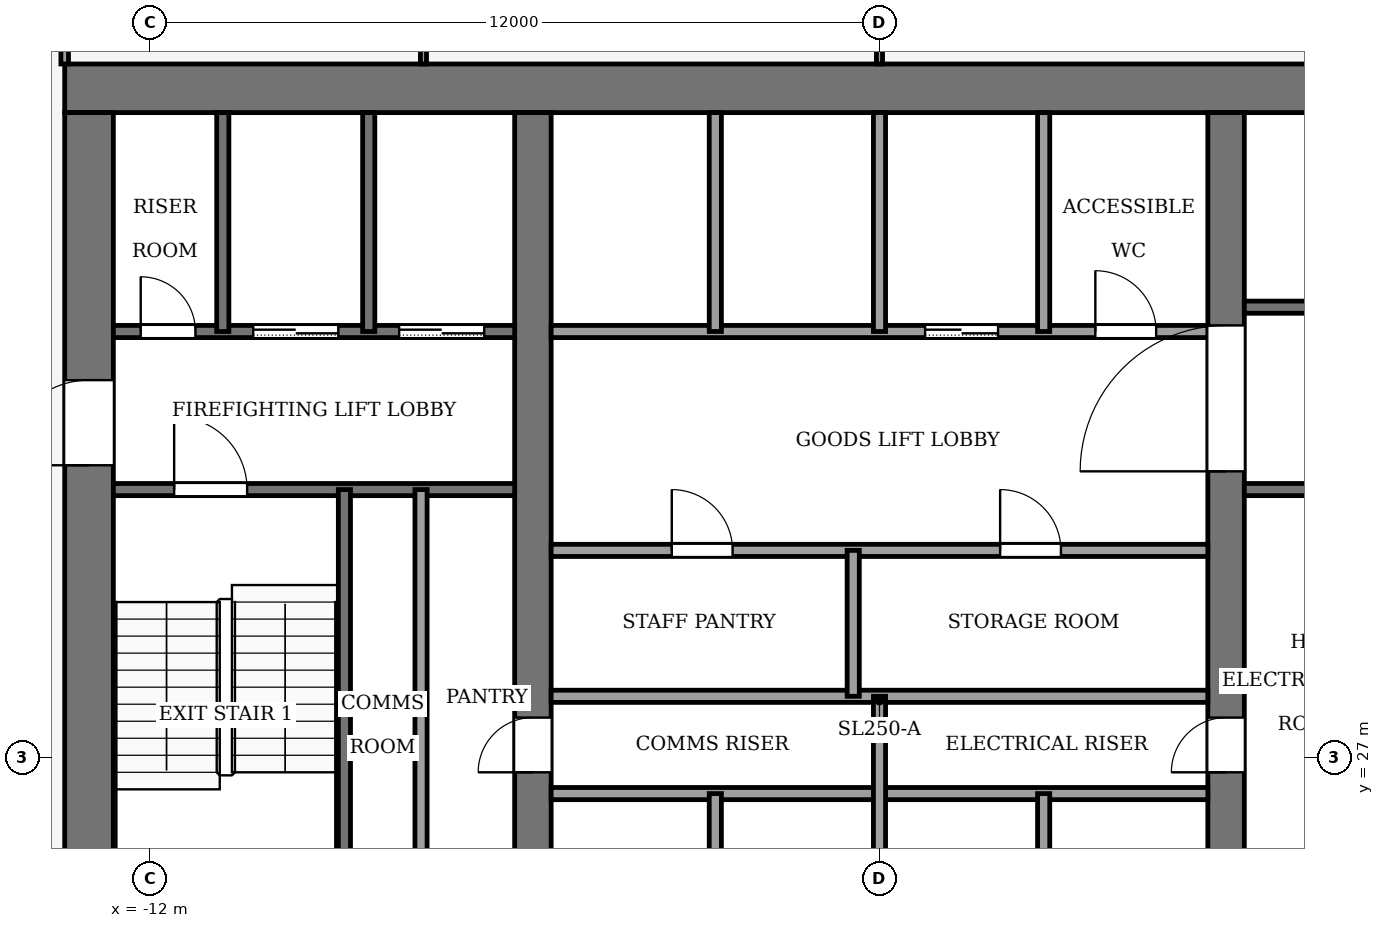
"""IFC4 building model, lengths in metres.
Left out: names, types, materials, properties, quantities, classifications, styles, units other than length and angle.
Written with IfcOpenShell. Run it as: python <this file> out.ifc"""

import sys

from ifc_helpers import new_model, si_unit, direction, frame, frame_2d, origin, place, context, subcontext, project, spatial, rectangle, extrude, element, fill, save


model = new_model("IFC4")
c1 = context("Model", 3, precision=1e-05, world=origin(), true_north=direction((0.0, 1.0)))
c2 = subcontext(c1, "Body", "Model", "MODEL_VIEW")
j1 = project(units=[si_unit("LENGTHUNIT", "METRE"), si_unit("PLANEANGLEUNIT", "RADIAN")], contexts=[c1])
p1 = place(None, origin())
s1 = spatial("IfcSite", under=j1, at=p1, CompositionType="ELEMENT")
p2 = place(p1, origin())
s2 = spatial("IfcBuilding", under=s1, at=p2, CompositionType="ELEMENT")
p3 = place(p2, frame((0.0, 0.0, 278.0)))
s3 = spatial("IfcBuildingStorey", under=s2, at=p3, CompositionType="ELEMENT", Elevation=278.0)
p4 = place(p3, frame((-13.4, 38.0, -0.13), z_axis=(0.0, 0.0, 1.0), x_axis=(1.0, 0.0, 0.0)))
e1 = element("IfcWall", 1, at=p4, inside=s3, PredefinedType="SHEAR", context=c2, shape_type="SweptSolid", body=[
    extrude(rectangle(XDim=26.8, YDim=0.8, at=frame_2d((13.4, 0.0))), origin(), (0.0, 0.0, 1.0), 3.88),
])
p5 = place(p3, frame((-13.0, 18.4, -0.13), z_axis=(0.0, 0.0, 1.0), x_axis=(0.0, 1.0, 0.0)))
e2 = element("IfcWall", 2, at=p5, inside=s3, PredefinedType="SHEAR", context=c2, shape_type="SweptSolid", body=[
    extrude(rectangle(XDim=19.2, YDim=0.8, at=frame_2d((9.6, 0.0))), origin(), (0.0, 0.0, 1.0), 3.88),
])
p6 = place(p5, frame((2.8, 0.0, 0.13)))
e3 = element("IfcOpeningElement", 3, at=p6, cuts=e2, PredefinedType="OPENING", context=c2, shape_type="SweptSolid", body=[
    extrude(rectangle(XDim=2.4, YDim=2.4, at=frame_2d((1.2, 1.2))), frame((0.0, 0.41, 0.0), z_axis=(0.0, -1.0, 0.0), x_axis=(1.0, 0.0, 0.0)), (0.0, 0.0, 1.0), 0.82),
])
p7 = place(p5, frame((13.4, 0.0, 0.13)))
e4 = element("IfcOpeningElement", 4, at=p7, cuts=e2, PredefinedType="OPENING", context=c2, shape_type="SweptSolid", body=[
    extrude(rectangle(XDim=1.4, YDim=2.2, at=frame_2d((0.7, 1.1))), frame((0.0, 0.41, 0.0), z_axis=(0.0, -1.0, 0.0), x_axis=(1.0, 0.0, 0.0)), (0.0, 0.0, 1.0), 0.82),
])
p8 = place(p3, frame((-5.7, 18.4, -0.13), z_axis=(0.0, 0.0, 1.0), x_axis=(0.0, 1.0, 0.0)))
e5 = element("IfcWall", 5, at=p8, inside=s3, PredefinedType="SHEAR", context=c2, shape_type="SweptSolid", body=[
    extrude(rectangle(XDim=19.2, YDim=0.6, at=frame_2d((9.6, 0.0))), origin(), (0.0, 0.0, 1.0), 3.88),
])
p9 = place(p8, frame((8.35, 0.0, 0.13)))
e6 = element("IfcOpeningElement", 6, at=p9, cuts=e5, PredefinedType="OPENING", context=c2, shape_type="SweptSolid", body=[
    extrude(rectangle(XDim=0.9, YDim=2.1, at=frame_2d((0.45, 1.05))), frame((0.0, 0.31, 0.0), z_axis=(0.0, -1.0, 0.0), x_axis=(1.0, 0.0, 0.0)), (0.0, 0.0, 1.0), 0.62),
])
p10 = place(p3, frame((5.7, 18.4, -0.13), z_axis=(0.0, 0.0, 1.0), x_axis=(0.0, 1.0, 0.0)))
e7 = element("IfcWall", 7, at=p10, inside=s3, PredefinedType="SHEAR", context=c2, shape_type="SweptSolid", body=[
    extrude(rectangle(XDim=19.2, YDim=0.6, at=frame_2d((9.6, 0.0))), origin(), (0.0, 0.0, 1.0), 3.88),
])
p11 = place(p10, frame((8.35, 0.0, 0.13)))
e8 = element("IfcOpeningElement", 8, at=p11, cuts=e7, PredefinedType="OPENING", context=c2, shape_type="SweptSolid", body=[
    extrude(rectangle(XDim=0.9, YDim=2.1, at=frame_2d((0.45, 1.05))), frame((0.0, 0.31, 0.0), z_axis=(0.0, -1.0, 0.0), x_axis=(1.0, 0.0, 0.0)), (0.0, 0.0, 1.0), 0.62),
])
p12 = place(p10, frame((13.3, 0.0, 0.13)))
e9 = element("IfcOpeningElement", 9, at=p12, cuts=e7, PredefinedType="OPENING", context=c2, shape_type="SweptSolid", body=[
    extrude(rectangle(XDim=2.4, YDim=2.4, at=frame_2d((1.2, 1.2))), frame((0.0, 0.31, 0.0), z_axis=(0.0, -1.0, 0.0), x_axis=(1.0, 0.0, 0.0)), (0.0, 0.0, 1.0), 0.62),
])
for number, where, z_axis, x_axis in (
    (10, (-5.4, 26.4, 0.0), (0.0, 0.0, 1.0), (1.0, 0.0, 0.0)),
    (11, (-5.4, 28.0, 0.0), (0.0, 0.0, 1.0), (1.0, 0.0, 0.0)),
):
    element("IfcWall", number, at=place(p3, frame(where, z_axis=z_axis, x_axis=x_axis)), inside=s3, PredefinedType="PARTITIONING", context=c2, shape_type="SweptSolid", body=[
        extrude(rectangle(XDim=10.8, YDim=0.2, at=frame_2d((5.4, 0.0))), origin(), (0.0, 0.0, 1.0), 3.75),
    ])
p13 = place(p3, frame((-5.4, 30.4, 0.0), z_axis=(0.0, 0.0, 1.0), x_axis=(1.0, 0.0, 0.0)))
e12 = element("IfcWall", 12, at=p13, inside=s3, PredefinedType="PARTITIONING", context=c2, shape_type="SweptSolid", body=[
    extrude(rectangle(XDim=10.8, YDim=0.2, at=frame_2d((5.4, 0.0))), origin(), (0.0, 0.0, 1.0), 3.75),
])
p14 = place(p13, frame((1.984, 0.0, 0.0)))
e13 = element("IfcOpeningElement", 13, at=p14, cuts=e12, PredefinedType="OPENING", context=c2, shape_type="SweptSolid", body=[
    extrude(rectangle(XDim=1.0, YDim=2.1, at=frame_2d((0.5, 1.05))), frame((0.0, 0.11, 0.0), z_axis=(0.0, -1.0, 0.0), x_axis=(1.0, 0.0, 0.0)), (0.0, 0.0, 1.0), 0.22),
])
p15 = place(p13, frame((7.384, 0.0, 0.0)))
e14 = element("IfcOpeningElement", 14, at=p15, cuts=e12, PredefinedType="OPENING", context=c2, shape_type="SweptSolid", body=[
    extrude(rectangle(XDim=1.0, YDim=2.1, at=frame_2d((0.5, 1.05))), frame((0.0, 0.11, 0.0), z_axis=(0.0, -1.0, 0.0), x_axis=(1.0, 0.0, 0.0)), (0.0, 0.0, 1.0), 0.22),
])
p16 = place(p3, frame((-12.6, 31.4, 0.0), z_axis=(0.0, 0.0, 1.0), x_axis=(1.0, 0.0, 0.0)))
e15 = element("IfcWall", 15, at=p16, inside=s3, PredefinedType="PARTITIONING", context=c2, shape_type="SweptSolid", body=[
    extrude(rectangle(XDim=6.6, YDim=0.2, at=frame_2d((3.3, 0.0))), origin(), (0.0, 0.0, 1.0), 3.75),
])
p17 = place(p16, frame((1.0, 0.0, 0.0)))
e16 = element("IfcOpeningElement", 16, at=p17, cuts=e15, PredefinedType="OPENING", context=c2, shape_type="SweptSolid", body=[
    extrude(rectangle(XDim=1.2, YDim=2.2, at=frame_2d((0.6, 1.1))), frame((0.0, 0.11, 0.0), z_axis=(0.0, -1.0, 0.0), x_axis=(1.0, 0.0, 0.0)), (0.0, 0.0, 1.0), 0.22),
])
p18 = place(p3, frame((6.0, 31.4, 0.0), z_axis=(0.0, 0.0, 1.0), x_axis=(1.0, 0.0, 0.0)))
e17 = element("IfcWall", 17, at=p18, inside=s3, PredefinedType="PARTITIONING", context=c2, shape_type="SweptSolid", body=[
    extrude(rectangle(XDim=6.6, YDim=0.2, at=frame_2d((3.3, 0.0))), origin(), (0.0, 0.0, 1.0), 3.75),
])
p19 = place(p3, frame((-12.6, 34.0, 0.0), z_axis=(0.0, 0.0, 1.0), x_axis=(1.0, 0.0, 0.0)))
e18 = element("IfcWall", 18, at=p19, inside=s3, PredefinedType="PARTITIONING", context=c2, shape_type="SweptSolid", body=[
    extrude(rectangle(XDim=6.6, YDim=0.2, at=frame_2d((3.3, 0.0))), origin(), (0.0, 0.0, 1.0), 3.75),
])
p20 = place(p19, frame((4.7, 0.0, 0.0)))
e19 = element("IfcOpeningElement", 19, at=p20, cuts=e18, PredefinedType="OPENING", context=c2, shape_type="SweptSolid", body=[
    extrude(rectangle(XDim=1.4, YDim=2.2, at=frame_2d((0.7, 1.1))), frame((0.0, 0.11, 0.0), z_axis=(0.0, -1.0, 0.0), x_axis=(1.0, 0.0, 0.0)), (0.0, 0.0, 1.0), 0.22),
])
p21 = place(p19, frame((2.3, 0.0, 0.0)))
e20 = element("IfcOpeningElement", 20, at=p21, cuts=e18, PredefinedType="OPENING", context=c2, shape_type="SweptSolid", body=[
    extrude(rectangle(XDim=1.4, YDim=2.2, at=frame_2d((0.7, 1.1))), frame((0.0, 0.11, 0.0), z_axis=(0.0, -1.0, 0.0), x_axis=(1.0, 0.0, 0.0)), (0.0, 0.0, 1.0), 0.22),
])
p22 = place(p19, frame((0.45, 0.0, 0.0)))
e21 = element("IfcOpeningElement", 21, at=p22, cuts=e18, PredefinedType="OPENING", context=c2, shape_type="SweptSolid", body=[
    extrude(rectangle(XDim=0.9, YDim=2.1, at=frame_2d((0.45, 1.05))), frame((0.0, 0.11, 0.0), z_axis=(0.0, -1.0, 0.0), x_axis=(1.0, 0.0, 0.0)), (0.0, 0.0, 1.0), 0.22),
])
p23 = place(p3, frame((-5.4, 34.0, 0.0), z_axis=(0.0, 0.0, 1.0), x_axis=(1.0, 0.0, 0.0)))
e22 = element("IfcWall", 22, at=p23, inside=s3, PredefinedType="PARTITIONING", context=c2, shape_type="SweptSolid", body=[
    extrude(rectangle(XDim=10.8, YDim=0.2, at=frame_2d((5.4, 0.0))), origin(), (0.0, 0.0, 1.0), 3.75),
])
p24 = place(p23, frame((6.15, 0.0, 0.0)))
e23 = element("IfcOpeningElement", 23, at=p24, cuts=e22, PredefinedType="OPENING", context=c2, shape_type="SweptSolid", body=[
    extrude(rectangle(XDim=1.2, YDim=2.2, at=frame_2d((0.6, 1.1))), frame((0.0, 0.11, 0.0), z_axis=(0.0, -1.0, 0.0), x_axis=(1.0, 0.0, 0.0)), (0.0, 0.0, 1.0), 0.22),
])
p25 = place(p23, frame((8.95, 0.0, 0.0)))
e24 = element("IfcOpeningElement", 24, at=p25, cuts=e22, PredefinedType="OPENING", context=c2, shape_type="SweptSolid", body=[
    extrude(rectangle(XDim=1.0, YDim=2.1, at=frame_2d((0.5, 1.05))), frame((0.0, 0.11, 0.0), z_axis=(0.0, -1.0, 0.0), x_axis=(1.0, 0.0, 0.0)), (0.0, 0.0, 1.0), 0.22),
])
p26 = place(p3, frame((6.0, 34.4, 0.0), z_axis=(0.0, 0.0, 1.0), x_axis=(1.0, 0.0, 0.0)))
e25 = element("IfcWall", 25, at=p26, inside=s3, PredefinedType="PARTITIONING", context=c2, shape_type="SweptSolid", body=[
    extrude(rectangle(XDim=6.6, YDim=0.2, at=frame_2d((3.3, 0.0))), origin(), (0.0, 0.0, 1.0), 3.75),
])
p27 = place(p26, frame((4.8, 0.0, 0.0)))
e26 = element("IfcOpeningElement", 26, at=p27, cuts=e25, PredefinedType="OPENING", context=c2, shape_type="SweptSolid", body=[
    extrude(rectangle(XDim=1.2, YDim=2.2, at=frame_2d((0.6, 1.1))), frame((0.0, 0.11, 0.0), z_axis=(0.0, -1.0, 0.0), x_axis=(1.0, 0.0, 0.0)), (0.0, 0.0, 1.0), 0.22),
])
p28 = place(p3, frame((-10.8, 34.0, 0.0), z_axis=(0.0, 0.0, 1.0), x_axis=(0.0, 1.0, 0.0)))
e27 = element("IfcWall", 27, at=p28, inside=s3, PredefinedType="PARTITIONING", context=c2, shape_type="SweptSolid", body=[
    extrude(rectangle(XDim=3.6, YDim=0.2, at=frame_2d((1.8, 0.0))), origin(), (0.0, 0.0, 1.0), 3.75),
])
p29 = place(p3, frame((-8.8, 24.0, 0.0), z_axis=(0.0, 0.0, 1.0), x_axis=(0.0, 1.0, 0.0)))
e28 = element("IfcWall", 28, at=p29, inside=s3, PredefinedType="PARTITIONING", context=c2, shape_type="SweptSolid", body=[
    extrude(rectangle(XDim=7.4, YDim=0.2, at=frame_2d((3.7, 0.0))), origin(), (0.0, 0.0, 1.0), 3.75),
])
p30 = place(p3, frame((-8.4, 34.0, 0.0), z_axis=(0.0, 0.0, 1.0), x_axis=(0.0, 1.0, 0.0)))
e29 = element("IfcWall", 29, at=p30, inside=s3, PredefinedType="PARTITIONING", context=c2, shape_type="SweptSolid", body=[
    extrude(rectangle(XDim=3.6, YDim=0.2, at=frame_2d((1.8, 0.0))), origin(), (0.0, 0.0, 1.0), 3.75),
])
p31 = place(p3, frame((-7.54, 24.0, 0.0), z_axis=(0.0, 0.0, 1.0), x_axis=(0.0, 1.0, 0.0)))
e30 = element("IfcWall", 30, at=p31, inside=s3, PredefinedType="PARTITIONING", context=c2, shape_type="SweptSolid", body=[
    extrude(rectangle(XDim=7.4, YDim=0.2, at=frame_2d((3.7, 0.0))), origin(), (0.0, 0.0, 1.0), 3.75),
])
p32 = place(p3, frame((-2.7, 24.0, 0.0), z_axis=(0.0, 0.0, 1.0), x_axis=(0.0, 1.0, 0.0)))
e31 = element("IfcWall", 31, at=p32, inside=s3, PredefinedType="PARTITIONING", context=c2, shape_type="SweptSolid", body=[
    extrude(rectangle(XDim=2.4, YDim=0.2, at=frame_2d((1.2, 0.0))), origin(), (0.0, 0.0, 1.0), 3.75),
])
p33 = place(p3, frame((-2.7, 34.0, 0.0), z_axis=(0.0, 0.0, 1.0), x_axis=(0.0, 1.0, 0.0)))
e32 = element("IfcWall", 32, at=p33, inside=s3, PredefinedType="PARTITIONING", context=c2, shape_type="SweptSolid", body=[
    extrude(rectangle(XDim=3.6, YDim=0.2, at=frame_2d((1.8, 0.0))), origin(), (0.0, 0.0, 1.0), 3.75),
])
p34 = place(p3, frame((-0.432, 28.0, 0.0), z_axis=(0.0, 0.0, 1.0), x_axis=(0.0, 1.0, 0.0)))
e33 = element("IfcWall", 33, at=p34, inside=s3, PredefinedType="PARTITIONING", context=c2, shape_type="SweptSolid", body=[
    extrude(rectangle(XDim=2.4, YDim=0.2, at=frame_2d((1.2, 0.0))), origin(), (0.0, 0.0, 1.0), 3.75),
])
p35 = place(p3, frame((0.0, 24.0, 0.0), z_axis=(0.0, 0.0, 1.0), x_axis=(0.0, 1.0, 0.0)))
e34 = element("IfcWall", 34, at=p35, inside=s3, PredefinedType="PARTITIONING", context=c2, shape_type="SweptSolid", body=[
    extrude(rectangle(XDim=4.0, YDim=0.2, at=frame_2d((2.0, 0.0))), origin(), (0.0, 0.0, 1.0), 3.75),
])
p36 = place(p3, frame((0.0, 34.0, 0.0), z_axis=(0.0, 0.0, 1.0), x_axis=(0.0, 1.0, 0.0)))
e35 = element("IfcWall", 35, at=p36, inside=s3, PredefinedType="PARTITIONING", context=c2, shape_type="SweptSolid", body=[
    extrude(rectangle(XDim=3.6, YDim=0.2, at=frame_2d((1.8, 0.0))), origin(), (0.0, 0.0, 1.0), 3.75),
])
p37 = place(p3, frame((2.7, 24.0, 0.0), z_axis=(0.0, 0.0, 1.0), x_axis=(0.0, 1.0, 0.0)))
e36 = element("IfcWall", 36, at=p37, inside=s3, PredefinedType="PARTITIONING", context=c2, shape_type="SweptSolid", body=[
    extrude(rectangle(XDim=2.4, YDim=0.2, at=frame_2d((1.2, 0.0))), origin(), (0.0, 0.0, 1.0), 3.75),
])
p38 = place(p3, frame((2.7, 34.0, 0.0), z_axis=(0.0, 0.0, 1.0), x_axis=(0.0, 1.0, 0.0)))
e37 = element("IfcWall", 37, at=p38, inside=s3, PredefinedType="PARTITIONING", context=c2, shape_type="SweptSolid", body=[
    extrude(rectangle(XDim=3.6, YDim=0.2, at=frame_2d((1.8, 0.0))), origin(), (0.0, 0.0, 1.0), 3.75),
])
p39 = place(p3, frame((-13.4, 40.5, 0.0), z_axis=(0.0, 0.0, 1.0), x_axis=(0.0, -1.0, 0.0)))
e38 = element("IfcWall", 38, at=p39, inside=s3, PredefinedType="PARTITIONING", context=c2, shape_type="SweptSolid", body=[
    extrude(rectangle(XDim=2.1, YDim=0.125, at=frame_2d((1.05, 0.0))), origin(), (0.0, 0.0, 1.0), 3.02),
])
p40 = place(p39, frame((0.55, 0.0, 0.0)))
e39 = element("IfcOpeningElement", 39, at=p40, cuts=e38, PredefinedType="OPENING", context=c2, shape_type="SweptSolid", body=[
    extrude(rectangle(XDim=1.0, YDim=2.1, at=frame_2d((0.5, 1.05))), frame((0.0, 0.073, 0.0), z_axis=(0.0, -1.0, 0.0), x_axis=(1.0, 0.0, 0.0)), (0.0, 0.0, 1.0), 0.145),
])
p41 = place(p3, frame((-7.5, 40.504, 0.0), z_axis=(0.0, 0.0, 1.0), x_axis=(0.0, -1.0, 0.0)))
e40 = element("IfcWall", 40, at=p41, inside=s3, PredefinedType="PARTITIONING", context=c2, shape_type="SweptSolid", body=[
    extrude(rectangle(XDim=2.104, YDim=0.1, at=frame_2d((1.052, 0.0))), origin(), (0.0, 0.0, 1.0), 3.75),
])
p42 = place(p41, frame((0.552, 0.0, 0.0)))
e41 = element("IfcOpeningElement", 41, at=p42, cuts=e40, PredefinedType="OPENING", context=c2, shape_type="SweptSolid", body=[
    extrude(rectangle(XDim=1.0, YDim=2.1, at=frame_2d((0.5, 1.05))), frame((0.0, 0.06, 0.0), z_axis=(0.0, -1.0, 0.0), x_axis=(1.0, 0.0, 0.0)), (0.0, 0.0, 1.0), 0.12),
])
p43 = place(p3, frame((0.0, 38.4, 0.0), z_axis=(0.0, 0.0, 1.0), x_axis=(0.0, 1.0, 0.0)))
e42 = element("IfcWall", 42, at=p43, inside=s3, PredefinedType="PARTITIONING", context=c2, shape_type="SweptSolid", body=[
    extrude(rectangle(XDim=2.1, YDim=0.1, at=frame_2d((1.05, 0.0))), origin(), (0.0, 0.0, 1.0), 3.32),
])
p44 = place(p24, origin())
e43 = element("IfcDoor", 43, at=p44, inside=s3, OperationType="SLIDING_TO_LEFT", PredefinedType="DOOR", context=c2, shape_type="SweptSolid", body=[
    extrude(rectangle(XDim=1.2, YDim=2.2, at=frame_2d((0.6, 1.1))), frame((0.0, 0.025, 0.0), z_axis=(0.0, -1.0, 0.0), x_axis=(1.0, 0.0, 0.0)), (0.0, 0.0, 1.0), 0.05),
])
fill(e23, e43)
p45 = place(p20, origin())
e44 = element("IfcDoor", 44, at=p45, inside=s3, OperationType="SLIDING_TO_LEFT", PredefinedType="DOOR", context=c2, shape_type="SweptSolid", body=[
    extrude(rectangle(XDim=1.4, YDim=2.2, at=frame_2d((0.7, 1.1))), frame((0.0, 0.025, 0.0), z_axis=(0.0, -1.0, 0.0), x_axis=(1.0, 0.0, 0.0)), (0.0, 0.0, 1.0), 0.05),
])
fill(e19, e44)
p46 = place(p21, origin())
e45 = element("IfcDoor", 45, at=p46, inside=s3, OperationType="SLIDING_TO_LEFT", PredefinedType="DOOR", context=c2, shape_type="SweptSolid", body=[
    extrude(rectangle(XDim=1.4, YDim=2.2, at=frame_2d((0.7, 1.1))), frame((0.0, 0.025, 0.0), z_axis=(0.0, -1.0, 0.0), x_axis=(1.0, 0.0, 0.0)), (0.0, 0.0, 1.0), 0.05),
])
fill(e20, e45)
p47 = place(p22, origin())
e46 = element("IfcDoor", 46, at=p47, inside=s3, OperationType="SINGLE_SWING_RIGHT", PredefinedType="DOOR", context=c2, shape_type="SweptSolid", body=[
    extrude(rectangle(XDim=0.9, YDim=2.1, at=frame_2d((0.45, 1.05))), frame((0.0, 0.025, 0.0), z_axis=(0.0, -1.0, 0.0), x_axis=(1.0, 0.0, 0.0)), (0.0, 0.0, 1.0), 0.05),
])
fill(e21, e46)
p48 = place(p14, origin())
e47 = element("IfcDoor", 47, at=p48, inside=s3, OperationType="SINGLE_SWING_LEFT", PredefinedType="DOOR", context=c2, shape_type="SweptSolid", body=[
    extrude(rectangle(XDim=1.0, YDim=2.1, at=frame_2d((0.5, 1.05))), frame((0.0, 0.025, 0.0), z_axis=(0.0, -1.0, 0.0), x_axis=(1.0, 0.0, 0.0)), (0.0, 0.0, 1.0), 0.05),
])
fill(e13, e47)
p49 = place(p15, origin())
e48 = element("IfcDoor", 48, at=p49, inside=s3, OperationType="SINGLE_SWING_RIGHT", PredefinedType="DOOR", context=c2, shape_type="SweptSolid", body=[
    extrude(rectangle(XDim=1.0, YDim=2.1, at=frame_2d((0.5, 1.05))), frame((0.0, 0.025, 0.0), z_axis=(0.0, -1.0, 0.0), x_axis=(1.0, 0.0, 0.0)), (0.0, 0.0, 1.0), 0.05),
])
fill(e14, e48)
p50 = place(p25, origin())
e49 = element("IfcDoor", 49, at=p50, inside=s3, OperationType="SINGLE_SWING_LEFT", PredefinedType="DOOR", context=c2, shape_type="SweptSolid", body=[
    extrude(rectangle(XDim=1.0, YDim=2.1, at=frame_2d((0.5, 1.05))), frame((0.0, 0.025, 0.0), z_axis=(0.0, -1.0, 0.0), x_axis=(1.0, 0.0, 0.0)), (0.0, 0.0, 1.0), 0.05),
])
fill(e24, e49)
p51 = place(p9, origin())
e50 = element("IfcDoor", 50, at=p51, inside=s3, OperationType="SINGLE_SWING_RIGHT", PredefinedType="DOOR", context=c2, shape_type="SweptSolid", body=[
    extrude(rectangle(XDim=0.9, YDim=2.1, at=frame_2d((0.45, 1.05))), frame((0.0, 0.025, 0.0), z_axis=(0.0, -1.0, 0.0), x_axis=(1.0, 0.0, 0.0)), (0.0, 0.0, 1.0), 0.05),
])
fill(e6, e50)
p52 = place(p11, origin())
e51 = element("IfcDoor", 51, at=p52, inside=s3, OperationType="SINGLE_SWING_LEFT", PredefinedType="DOOR", context=c2, shape_type="SweptSolid", body=[
    extrude(rectangle(XDim=0.9, YDim=2.1, at=frame_2d((0.45, 1.05))), frame((0.0, 0.025, 0.0), z_axis=(0.0, -1.0, 0.0), x_axis=(1.0, 0.0, 0.0)), (0.0, 0.0, 1.0), 0.05),
])
fill(e8, e51)
p53 = place(p17, origin())
e52 = element("IfcDoor", 52, at=p53, inside=s3, OperationType="SINGLE_SWING_LEFT", PredefinedType="DOOR", context=c2, shape_type="SweptSolid", body=[
    extrude(rectangle(XDim=1.2, YDim=2.2, at=frame_2d((0.6, 1.1))), frame((0.0, 0.025, 0.0), z_axis=(0.0, -1.0, 0.0), x_axis=(1.0, 0.0, 0.0)), (0.0, 0.0, 1.0), 0.05),
])
fill(e16, e52)
p54 = place(p12, origin())
e53 = element("IfcDoor", 53, at=p54, inside=s3, OperationType="DOUBLE_DOOR_SINGLE_SWING", PredefinedType="DOOR", context=c2, shape_type="SweptSolid", body=[
    extrude(rectangle(XDim=2.4, YDim=2.4, at=frame_2d((1.2, 1.2))), frame((0.0, 0.025, 0.0), z_axis=(0.0, -1.0, 0.0), x_axis=(1.0, 0.0, 0.0)), (0.0, 0.0, 1.0), 0.05),
])
fill(e9, e53)
p55 = place(p7, origin())
e54 = element("IfcDoor", 54, at=p55, inside=s3, OperationType="SINGLE_SWING_LEFT", PredefinedType="DOOR", context=c2, shape_type="SweptSolid", body=[
    extrude(rectangle(XDim=1.4, YDim=2.2, at=frame_2d((0.7, 1.1))), frame((0.0, 0.025, 0.0), z_axis=(0.0, -1.0, 0.0), x_axis=(1.0, 0.0, 0.0)), (0.0, 0.0, 1.0), 0.05),
])
fill(e4, e54)
save(model, sys.argv[1])
